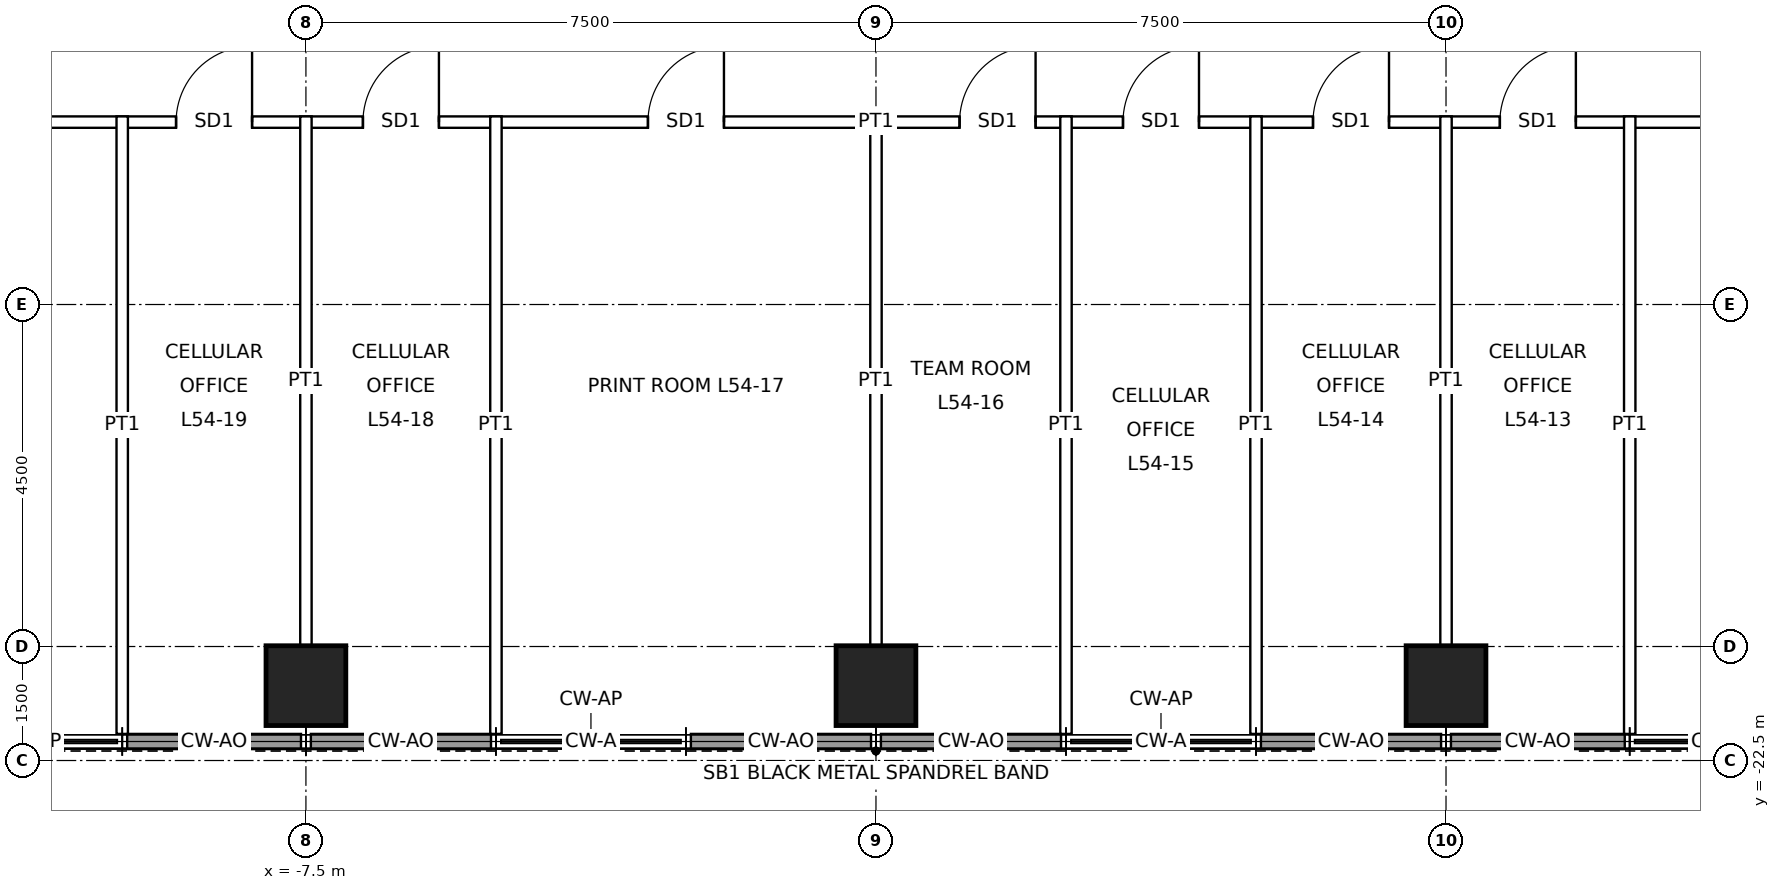
"""IFC4 building model, lengths in metres.
Left out: names, types, materials, properties, quantities, classifications, styles, units other than length and angle.
Written with IfcOpenShell. Run it as: python <this file> out.ifc"""

import sys

from ifc_helpers import new_model, si_unit, direction, frame, frame_2d, origin, origin_2d, place, context, subcontext, project, spatial, rectangle, hollow_rectangle, extrude, element, fill, save


model = new_model("IFC4")
c1 = context("Model", 3, precision=1e-05, world=origin(), true_north=direction((0.0, 1.0)))
c2 = subcontext(c1, "Body", "Model", "MODEL_VIEW")
j1 = project(units=[si_unit("LENGTHUNIT", "METRE"), si_unit("PLANEANGLEUNIT", "RADIAN")], contexts=[c1])
p1 = place(None, origin())
s1 = spatial("IfcSite", under=j1, at=p1, CompositionType="ELEMENT")
p2 = place(p1, origin())
s2 = spatial("IfcBuilding", under=s1, at=p2, CompositionType="ELEMENT")
p3 = place(p2, frame((0.0, 0.0, 249.9)))
s3 = spatial("IfcBuildingStorey", under=s2, at=p3, CompositionType="ELEMENT", Elevation=249.9)
for number, where, z_axis, x_axis in (
    (1, (7.5, -21.515, 0.0), (0.0, 0.0, 1.0), (1.0, 0.0, 0.0)),
    (2, (0.0, -21.515, 0.0), (0.0, 0.0, 1.0), (1.0, 0.0, 0.0)),
    (3, (-7.5, -21.515, 0.0), (0.0, 0.0, 1.0), (1.0, 0.0, 0.0)),
):
    element("IfcColumn", number, at=place(p3, frame(where, z_axis=z_axis, x_axis=x_axis)), inside=s3, PredefinedType="COLUMN", context=c2, shape_type="SweptSolid", body=[
        extrude(hollow_rectangle(XDim=1.05, YDim=1.05, WallThickness=0.07, at=origin_2d()), origin(), (0.0, 0.0, 1.0), 4.0),
    ])
p4 = place(p3, frame((9.852, -22.25, 0.0), z_axis=(0.0, 0.0, 1.0), x_axis=(-1.0, 0.0, 0.0)))
e4 = element("IfcWall", 4, at=p4, inside=s3, PredefinedType="SOLIDWALL", context=c2, shape_type="SweptSolid", body=[
    extrude(rectangle(XDim=2.287, YDim=0.2, at=frame_2d((1.144, 0.0))), origin(), (0.0, 0.0, 1.0), 3.75),
])
for number, where, z_axis, x_axis in (
    (5, (7.435, -22.25, 0.0), (0.0, 0.0, 1.0), (-1.0, 0.0, 0.0)),
    (6, (2.435, -22.25, 0.0), (0.0, 0.0, 1.0), (-1.0, 0.0, 0.0)),
    (7, (-0.065, -22.25, 0.0), (0.0, 0.0, 1.0), (-1.0, 0.0, 0.0)),
    (8, (-5.065, -22.25, 0.0), (0.0, 0.0, 1.0), (-1.0, 0.0, 0.0)),
):
    element("IfcWall", number, at=place(p3, frame(where, z_axis=z_axis, x_axis=x_axis)), inside=s3, PredefinedType="SOLIDWALL", context=c2, shape_type="SweptSolid", body=[
        extrude(rectangle(XDim=2.37, YDim=0.2, at=frame_2d((1.185, 0.0))), origin(), (0.0, 0.0, 1.0), 3.75),
    ])
p5 = place(p3, frame((-7.565, -22.25, 0.0), z_axis=(0.0, 0.0, 1.0), x_axis=(-1.0, 0.0, 0.0)))
e9 = element("IfcWall", 9, at=p5, inside=s3, PredefinedType="SOLIDWALL", context=c2, shape_type="SweptSolid", body=[
    extrude(rectangle(XDim=2.287, YDim=0.2, at=frame_2d((1.144, 0.0))), origin(), (0.0, 0.0, 1.0), 3.75),
])
p6 = place(p3, frame((-14.175, -14.1, 0.0), z_axis=(0.0, 0.0, 1.0), x_axis=(1.0, 0.0, 0.0)))
e10 = element("IfcWall", 10, at=p6, inside=s3, PredefinedType="PARTITIONING", context=c2, shape_type="SweptSolid", body=[
    extrude(rectangle(XDim=28.35, YDim=0.15, at=frame_2d((14.175, 0.0))), origin(), (0.0, 0.0, 1.0), 3.75),
])
p7 = place(p6, frame((22.384, 0.0, 0.0)))
e11 = element("IfcOpeningElement", 11, at=p7, cuts=e10, PredefinedType="OPENING", context=c2, shape_type="SweptSolid", body=[
    extrude(rectangle(XDim=1.0, YDim=2.4, at=frame_2d((0.5, 1.2))), frame((0.0, 0.085, 0.0), z_axis=(0.0, -1.0, 0.0), x_axis=(1.0, 0.0, 0.0)), (0.0, 0.0, 1.0), 0.17),
])
p8 = place(p6, frame((19.925, 0.0, 0.0)))
e12 = element("IfcOpeningElement", 12, at=p8, cuts=e10, PredefinedType="OPENING", context=c2, shape_type="SweptSolid", body=[
    extrude(rectangle(XDim=1.0, YDim=2.4, at=frame_2d((0.5, 1.2))), frame((0.0, 0.085, 0.0), z_axis=(0.0, -1.0, 0.0), x_axis=(1.0, 0.0, 0.0)), (0.0, 0.0, 1.0), 0.17),
])
p9 = place(p6, frame((17.425, 0.0, 0.0)))
e13 = element("IfcOpeningElement", 13, at=p9, cuts=e10, PredefinedType="OPENING", context=c2, shape_type="SweptSolid", body=[
    extrude(rectangle(XDim=1.0, YDim=2.4, at=frame_2d((0.5, 1.2))), frame((0.0, 0.085, 0.0), z_axis=(0.0, -1.0, 0.0), x_axis=(1.0, 0.0, 0.0)), (0.0, 0.0, 1.0), 0.17),
])
p10 = place(p6, frame((15.275, 0.0, 0.0)))
e14 = element("IfcOpeningElement", 14, at=p10, cuts=e10, PredefinedType="OPENING", context=c2, shape_type="SweptSolid", body=[
    extrude(rectangle(XDim=1.0, YDim=2.4, at=frame_2d((0.5, 1.2))), frame((0.0, 0.085, 0.0), z_axis=(0.0, -1.0, 0.0), x_axis=(1.0, 0.0, 0.0)), (0.0, 0.0, 1.0), 0.17),
])
p11 = place(p6, frame((11.175, 0.0, 0.0)))
e15 = element("IfcOpeningElement", 15, at=p11, cuts=e10, PredefinedType="OPENING", context=c2, shape_type="SweptSolid", body=[
    extrude(rectangle(XDim=1.0, YDim=2.4, at=frame_2d((0.5, 1.2))), frame((0.0, 0.085, 0.0), z_axis=(0.0, -1.0, 0.0), x_axis=(1.0, 0.0, 0.0)), (0.0, 0.0, 1.0), 0.17),
])
p12 = place(p6, frame((7.425, 0.0, 0.0)))
e16 = element("IfcOpeningElement", 16, at=p12, cuts=e10, PredefinedType="OPENING", context=c2, shape_type="SweptSolid", body=[
    extrude(rectangle(XDim=1.0, YDim=2.4, at=frame_2d((0.5, 1.2))), frame((0.0, 0.085, 0.0), z_axis=(0.0, -1.0, 0.0), x_axis=(1.0, 0.0, 0.0)), (0.0, 0.0, 1.0), 0.17),
])
p13 = place(p6, frame((4.967, 0.0, 0.0)))
e17 = element("IfcOpeningElement", 17, at=p13, cuts=e10, PredefinedType="OPENING", context=c2, shape_type="SweptSolid", body=[
    extrude(rectangle(XDim=1.0, YDim=2.4, at=frame_2d((0.5, 1.2))), frame((0.0, 0.085, 0.0), z_axis=(0.0, -1.0, 0.0), x_axis=(1.0, 0.0, 0.0)), (0.0, 0.0, 1.0), 0.17),
])
p14 = place(p6, frame((25.922, 0.0, 0.0)))
e18 = element("IfcOpeningElement", 18, at=p14, cuts=e10, PredefinedType="OPENING", context=c2, shape_type="SweptSolid", body=[
    extrude(rectangle(XDim=1.0, YDim=2.4, at=frame_2d((0.5, 1.2))), frame((0.0, 0.085, 0.0), z_axis=(0.0, -1.0, 0.0), x_axis=(1.0, 0.0, 0.0)), (0.0, 0.0, 1.0), 0.17),
])
p15 = place(p6, frame((1.667, 0.0, 0.0)))
e19 = element("IfcOpeningElement", 19, at=p15, cuts=e10, PredefinedType="OPENING", context=c2, shape_type="SweptSolid", body=[
    extrude(rectangle(XDim=1.0, YDim=2.4, at=frame_2d((0.5, 1.2))), frame((0.0, 0.085, 0.0), z_axis=(0.0, -1.0, 0.0), x_axis=(1.0, 0.0, 0.0)), (0.0, 0.0, 1.0), 0.17),
])
p16 = place(p3, frame((-9.917, -22.15, 0.0), z_axis=(0.0, 0.0, 1.0), x_axis=(0.0, 1.0, 0.0)))
e20 = element("IfcWall", 20, at=p16, inside=s3, PredefinedType="PARTITIONING", context=c2, shape_type="SweptSolid", body=[
    extrude(rectangle(XDim=8.125, YDim=0.15, at=frame_2d((4.062, 0.0))), origin(), (0.0, 0.0, 1.0), 3.75),
])
p17 = place(p3, frame((-7.5, -20.99, 0.0), z_axis=(0.0, 0.0, 1.0), x_axis=(0.0, 1.0, 0.0)))
e21 = element("IfcWall", 21, at=p17, inside=s3, PredefinedType="PARTITIONING", context=c2, shape_type="SweptSolid", body=[
    extrude(rectangle(XDim=6.965, YDim=0.15, at=frame_2d((3.482, 0.0))), origin(), (0.0, 0.0, 1.0), 3.75),
])
p18 = place(p3, frame((-5.0, -22.15, 0.0), z_axis=(0.0, 0.0, 1.0), x_axis=(0.0, 1.0, 0.0)))
e22 = element("IfcWall", 22, at=p18, inside=s3, PredefinedType="PARTITIONING", context=c2, shape_type="SweptSolid", body=[
    extrude(rectangle(XDim=8.125, YDim=0.15, at=frame_2d((4.062, 0.0))), origin(), (0.0, 0.0, 1.0), 3.75),
])
p19 = place(p3, frame((0.0, -20.99, 0.0), z_axis=(0.0, 0.0, 1.0), x_axis=(0.0, 1.0, 0.0)))
e23 = element("IfcWall", 23, at=p19, inside=s3, PredefinedType="PARTITIONING", context=c2, shape_type="SweptSolid", body=[
    extrude(rectangle(XDim=6.965, YDim=0.15, at=frame_2d((3.482, 0.0))), origin(), (0.0, 0.0, 1.0), 3.75),
])
for number, where, z_axis, x_axis in (
    (24, (2.5, -22.15, 0.0), (0.0, 0.0, 1.0), (0.0, 1.0, 0.0)),
    (25, (5.0, -22.15, 0.0), (0.0, 0.0, 1.0), (0.0, 1.0, 0.0)),
):
    element("IfcWall", number, at=place(p3, frame(where, z_axis=z_axis, x_axis=x_axis)), inside=s3, PredefinedType="PARTITIONING", context=c2, shape_type="SweptSolid", body=[
        extrude(rectangle(XDim=8.125, YDim=0.15, at=frame_2d((4.062, 0.0))), origin(), (0.0, 0.0, 1.0), 3.75),
    ])
p20 = place(p3, frame((7.5, -20.99, 0.0), z_axis=(0.0, 0.0, 1.0), x_axis=(0.0, 1.0, 0.0)))
e26 = element("IfcWall", 26, at=p20, inside=s3, PredefinedType="PARTITIONING", context=c2, shape_type="SweptSolid", body=[
    extrude(rectangle(XDim=6.965, YDim=0.15, at=frame_2d((3.482, 0.0))), origin(), (0.0, 0.0, 1.0), 3.75),
])
p21 = place(p3, frame((9.917, -22.15, 0.0), z_axis=(0.0, 0.0, 1.0), x_axis=(0.0, 1.0, 0.0)))
e27 = element("IfcWall", 27, at=p21, inside=s3, PredefinedType="PARTITIONING", context=c2, shape_type="SweptSolid", body=[
    extrude(rectangle(XDim=8.125, YDim=0.15, at=frame_2d((4.062, 0.0))), origin(), (0.0, 0.0, 1.0), 3.75),
])
p22 = place(p7, origin())
e28 = element("IfcDoor", 28, at=p22, inside=s3, OperationType="SINGLE_SWING_RIGHT", PredefinedType="DOOR", context=c2, shape_type="SweptSolid", body=[
    extrude(rectangle(XDim=1.0, YDim=2.4, at=frame_2d((0.5, 1.2))), frame((0.0, 0.025, 0.0), z_axis=(0.0, -1.0, 0.0), x_axis=(1.0, 0.0, 0.0)), (0.0, 0.0, 1.0), 0.05),
])
fill(e11, e28)
p23 = place(p8, origin())
e29 = element("IfcDoor", 29, at=p23, inside=s3, OperationType="SINGLE_SWING_RIGHT", PredefinedType="DOOR", context=c2, shape_type="SweptSolid", body=[
    extrude(rectangle(XDim=1.0, YDim=2.4, at=frame_2d((0.5, 1.2))), frame((0.0, 0.025, 0.0), z_axis=(0.0, -1.0, 0.0), x_axis=(1.0, 0.0, 0.0)), (0.0, 0.0, 1.0), 0.05),
])
fill(e12, e29)
p24 = place(p9, origin())
e30 = element("IfcDoor", 30, at=p24, inside=s3, OperationType="SINGLE_SWING_RIGHT", PredefinedType="DOOR", context=c2, shape_type="SweptSolid", body=[
    extrude(rectangle(XDim=1.0, YDim=2.4, at=frame_2d((0.5, 1.2))), frame((0.0, 0.025, 0.0), z_axis=(0.0, -1.0, 0.0), x_axis=(1.0, 0.0, 0.0)), (0.0, 0.0, 1.0), 0.05),
])
fill(e13, e30)
p25 = place(p10, origin())
e31 = element("IfcDoor", 31, at=p25, inside=s3, OperationType="SINGLE_SWING_RIGHT", PredefinedType="DOOR", context=c2, shape_type="SweptSolid", body=[
    extrude(rectangle(XDim=1.0, YDim=2.4, at=frame_2d((0.5, 1.2))), frame((0.0, 0.025, 0.0), z_axis=(0.0, -1.0, 0.0), x_axis=(1.0, 0.0, 0.0)), (0.0, 0.0, 1.0), 0.05),
])
fill(e14, e31)
p26 = place(p11, origin())
e32 = element("IfcDoor", 32, at=p26, inside=s3, OperationType="SINGLE_SWING_RIGHT", PredefinedType="DOOR", context=c2, shape_type="SweptSolid", body=[
    extrude(rectangle(XDim=1.0, YDim=2.4, at=frame_2d((0.5, 1.2))), frame((0.0, 0.025, 0.0), z_axis=(0.0, -1.0, 0.0), x_axis=(1.0, 0.0, 0.0)), (0.0, 0.0, 1.0), 0.05),
])
fill(e15, e32)
p27 = place(p12, origin())
e33 = element("IfcDoor", 33, at=p27, inside=s3, OperationType="SINGLE_SWING_RIGHT", PredefinedType="DOOR", context=c2, shape_type="SweptSolid", body=[
    extrude(rectangle(XDim=1.0, YDim=2.4, at=frame_2d((0.5, 1.2))), frame((0.0, 0.025, 0.0), z_axis=(0.0, -1.0, 0.0), x_axis=(1.0, 0.0, 0.0)), (0.0, 0.0, 1.0), 0.05),
])
fill(e16, e33)
p28 = place(p13, origin())
e34 = element("IfcDoor", 34, at=p28, inside=s3, OperationType="SINGLE_SWING_RIGHT", PredefinedType="DOOR", context=c2, shape_type="SweptSolid", body=[
    extrude(rectangle(XDim=1.0, YDim=2.4, at=frame_2d((0.5, 1.2))), frame((0.0, 0.025, 0.0), z_axis=(0.0, -1.0, 0.0), x_axis=(1.0, 0.0, 0.0)), (0.0, 0.0, 1.0), 0.05),
])
fill(e17, e34)
save(model, sys.argv[1])
